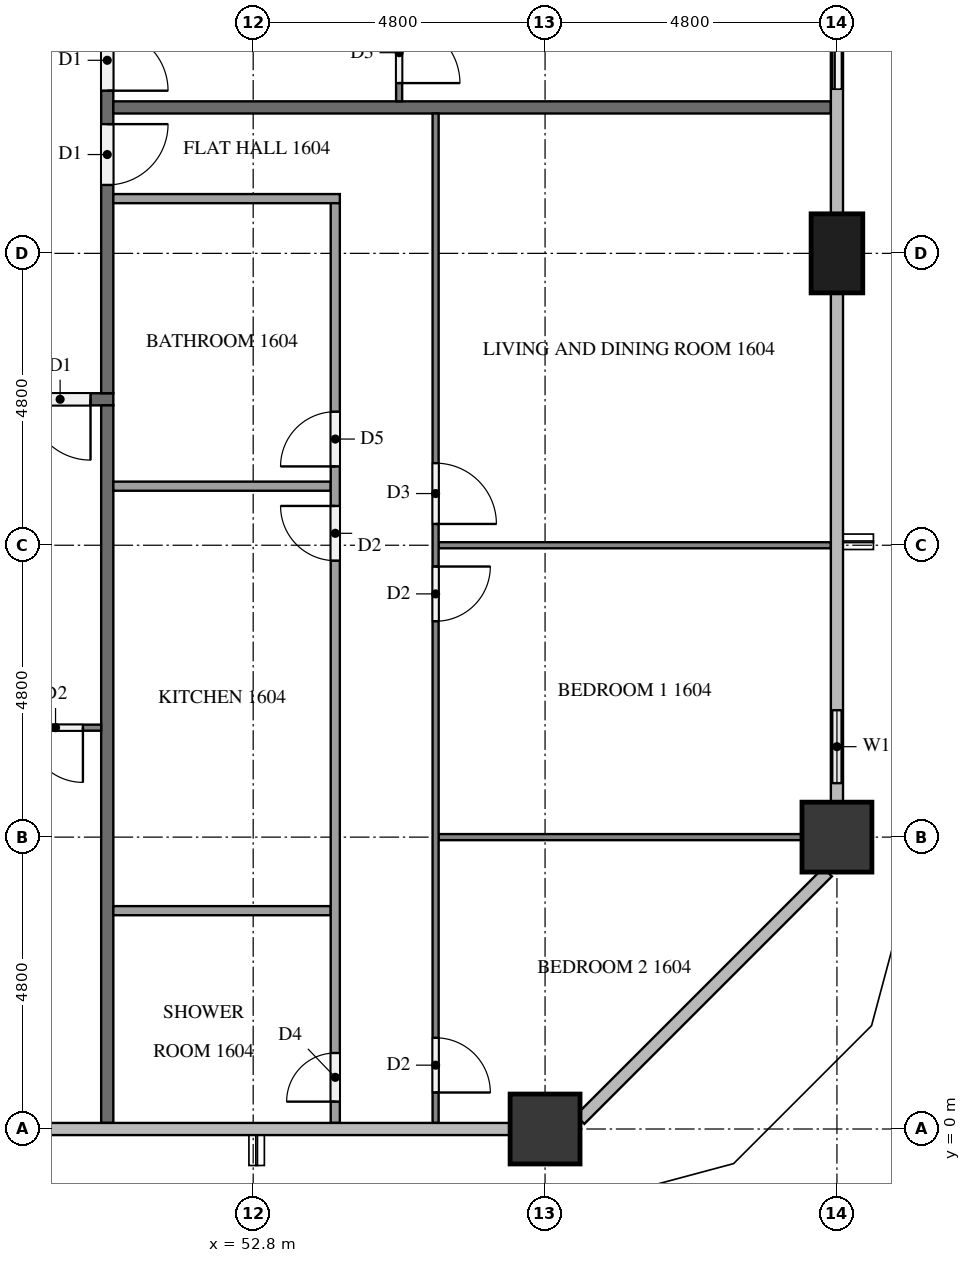
"""IFC4 building model, lengths in metres.
Left out: names, types, materials, properties, quantities, classifications, styles, units other than length and angle.
Written with IfcOpenShell. Run it as: python <this file> out.ifc"""

import sys

from ifc_helpers import new_model, si_unit, direction, frame, frame_2d, origin, origin_2d, place, context, subcontext, project, spatial, rectangle, extrude, element, fill, save


model = new_model("IFC4")
c1 = context("Model", 3, precision=1e-05, world=origin(), true_north=direction((0.0, 1.0)))
c2 = subcontext(c1, "Body", "Model", "MODEL_VIEW")
j1 = project(units=[si_unit("LENGTHUNIT", "METRE"), si_unit("PLANEANGLEUNIT", "RADIAN")], contexts=[c1])
p1 = place(None, origin())
s1 = spatial("IfcSite", under=j1, at=p1, CompositionType="ELEMENT")
p2 = place(p1, origin())
s2 = spatial("IfcBuilding", under=s1, at=p2, CompositionType="ELEMENT")
p3 = place(p2, frame((0.0, 0.0, 66.3)))
s3 = spatial("IfcBuildingStorey", under=s2, at=p3, CompositionType="ELEMENT", Elevation=66.3)
for number, where, z_axis, x_axis in (
    (1, (57.6, 0.0, 0.0), (0.0, 0.0, 1.0), (1.0, 0.0, 0.0)),
    (2, (62.4, 4.8, 0.0), (0.0, 0.0, 1.0), (1.0, 0.0, 0.0)),
):
    element("IfcColumn", number, at=place(p3, frame(where, z_axis=z_axis, x_axis=x_axis)), inside=s3, PredefinedType="COLUMN", context=c2, shape_type="SweptSolid", body=[
        extrude(rectangle(XDim=1.15, YDim=1.15, at=origin_2d()), origin(), (0.0, 0.0, 1.0), 3.2),
    ])
p4 = place(p3, frame((62.4, 14.4, 0.0), z_axis=(0.0, 0.0, 1.0), x_axis=(0.0, 1.0, 0.0)))
e3 = element("IfcColumn", 3, at=p4, inside=s3, PredefinedType="COLUMN", context=c2, shape_type="SweptSolid", body=[
    extrude(rectangle(XDim=1.3, YDim=0.85, at=origin_2d()), origin(), (0.0, 0.0, 1.0), 3.2),
])
p5 = place(p3, frame((62.4, 5.375, 0.0), z_axis=(0.0, 0.0, 1.0), x_axis=(0.0, 1.0, 0.0)))
e4 = element("IfcWall", 4, at=p5, inside=s3, PredefinedType="SOLIDWALL", context=c2, shape_type="SweptSolid", body=[
    extrude(rectangle(XDim=1.825, YDim=0.15, at=frame_2d((0.913, 0.0))), origin(), (0.0, 0.0, 1.0), 3.2),
])
p6 = place(p5, frame((0.312, 0.0, 0.9)))
e5 = element("IfcOpeningElement", 5, at=p6, cuts=e4, PredefinedType="OPENING", context=c2, shape_type="SweptSolid", body=[
    extrude(rectangle(XDim=1.2, YDim=1.4, at=frame_2d((0.6, 0.7))), frame((0.0, 0.085, 0.0), z_axis=(0.0, -1.0, 0.0), x_axis=(1.0, 0.0, 0.0)), (0.0, 0.0, 1.0), 0.17),
])
p7 = place(p3, frame((62.4, 16.8, 0.0), z_axis=(0.0, 0.0, 1.0), x_axis=(0.0, 1.0, 0.0)))
e6 = element("IfcWall", 6, at=p7, inside=s3, PredefinedType="SOLIDWALL", context=c2, shape_type="SweptSolid", body=[
    extrude(rectangle(XDim=2.4, YDim=0.15, at=frame_2d((1.2, 0.0))), origin(), (0.0, 0.0, 1.0), 3.2),
])
p8 = place(p7, frame((0.3, 0.0, 0.0)))
e7 = element("IfcOpeningElement", 7, at=p8, cuts=e6, PredefinedType="OPENING", context=c2, shape_type="SweptSolid", body=[
    extrude(rectangle(XDim=1.8, YDim=2.4, at=frame_2d((0.9, 1.2))), frame((0.0, 0.085, 0.0), z_axis=(0.0, -1.0, 0.0), x_axis=(1.0, 0.0, 0.0)), (0.0, 0.0, 1.0), 0.17),
])
p9 = place(p3, frame((50.5, 12.0, 0.0), z_axis=(0.0, 0.0, 1.0), x_axis=(-1.0, 0.0, 0.0)))
e8 = element("IfcWall", 8, at=p9, inside=s3, PredefinedType="PARTITIONING", context=c2, shape_type="SweptSolid", body=[
    extrude(rectangle(XDim=38.6, YDim=0.2, at=frame_2d((19.3, 0.0))), origin(), (0.0, 0.0, 1.0), 3.2),
])
p10 = place(p9, frame((37.225, 0.0, 0.0)))
e9 = element("IfcOpeningElement", 9, at=p10, cuts=e8, PredefinedType="OPENING", context=c2, shape_type="SweptSolid", body=[
    extrude(rectangle(XDim=1.0, YDim=2.1, at=frame_2d((0.5, 1.05))), frame((0.0, 0.11, 0.0), z_axis=(0.0, -1.0, 0.0), x_axis=(1.0, 0.0, 0.0)), (0.0, 0.0, 1.0), 0.22),
])
p11 = place(p9, frame((22.825, 0.0, 0.0)))
e10 = element("IfcOpeningElement", 10, at=p11, cuts=e8, PredefinedType="OPENING", context=c2, shape_type="SweptSolid", body=[
    extrude(rectangle(XDim=1.0, YDim=2.1, at=frame_2d((0.5, 1.05))), frame((0.0, 0.11, 0.0), z_axis=(0.0, -1.0, 0.0), x_axis=(1.0, 0.0, 0.0)), (0.0, 0.0, 1.0), 0.22),
])
p12 = place(p9, frame((0.375, 0.0, 0.0)))
e11 = element("IfcOpeningElement", 11, at=p12, cuts=e8, PredefinedType="OPENING", context=c2, shape_type="SweptSolid", body=[
    extrude(rectangle(XDim=1.0, YDim=2.1, at=frame_2d((0.5, 1.05))), frame((0.0, 0.11, 0.0), z_axis=(0.0, -1.0, 0.0), x_axis=(1.0, 0.0, 0.0)), (0.0, 0.0, 1.0), 0.22),
])
p13 = place(p3, frame((50.4, 40.7, 0.0), z_axis=(0.0, 0.0, 1.0), x_axis=(0.0, -1.0, 0.0)))
e12 = element("IfcWall", 12, at=p13, inside=s3, PredefinedType="PARTITIONING", context=c2, shape_type="SweptSolid", body=[
    extrude(rectangle(XDim=28.6, YDim=0.2, at=frame_2d((14.3, 0.0))), origin(), (0.0, 0.0, 1.0), 3.2),
])
p14 = place(p13, frame((24.175, 0.0, 0.0)))
e13 = element("IfcOpeningElement", 13, at=p14, cuts=e12, PredefinedType="OPENING", context=c2, shape_type="SweptSolid", body=[
    extrude(rectangle(XDim=1.0, YDim=2.1, at=frame_2d((0.5, 1.05))), frame((0.0, 0.11, 0.0), z_axis=(0.0, -1.0, 0.0), x_axis=(1.0, 0.0, 0.0)), (0.0, 0.0, 1.0), 0.22),
])
p15 = place(p13, frame((22.625, 0.0, 0.0)))
e14 = element("IfcOpeningElement", 14, at=p15, cuts=e12, PredefinedType="OPENING", context=c2, shape_type="SweptSolid", body=[
    extrude(rectangle(XDim=1.0, YDim=2.1, at=frame_2d((0.5, 1.05))), frame((0.0, 0.11, 0.0), z_axis=(0.0, -1.0, 0.0), x_axis=(1.0, 0.0, 0.0)), (0.0, 0.0, 1.0), 0.22),
])
p16 = place(p13, frame((10.625, 0.0, 0.0)))
e15 = element("IfcOpeningElement", 15, at=p16, cuts=e12, PredefinedType="OPENING", context=c2, shape_type="SweptSolid", body=[
    extrude(rectangle(XDim=1.0, YDim=2.1, at=frame_2d((0.5, 1.05))), frame((0.0, 0.11, 0.0), z_axis=(0.0, -1.0, 0.0), x_axis=(1.0, 0.0, 0.0)), (0.0, 0.0, 1.0), 0.22),
])
p17 = place(p3, frame((50.4, 11.9, 0.0), z_axis=(0.0, 0.0, 1.0), x_axis=(0.0, -1.0, 0.0)))
e16 = element("IfcWall", 16, at=p17, inside=s3, PredefinedType="PARTITIONING", context=c2, shape_type="SweptSolid", body=[
    extrude(rectangle(XDim=11.8, YDim=0.2, at=frame_2d((5.9, 0.0))), origin(), (0.0, 0.0, 1.0), 3.2),
])
p18 = place(p3, frame((50.5, 16.8, 0.0), z_axis=(0.0, 0.0, 1.0), x_axis=(1.0, 0.0, 0.0)))
e17 = element("IfcWall", 17, at=p18, inside=s3, PredefinedType="PARTITIONING", context=c2, shape_type="SweptSolid", body=[
    extrude(rectangle(XDim=11.8, YDim=0.2, at=frame_2d((5.9, 0.0))), origin(), (0.0, 0.0, 1.0), 3.2),
])
p19 = place(p3, frame((50.3, 6.6, 0.0), z_axis=(0.0, 0.0, 1.0), x_axis=(-1.0, 0.0, 0.0)))
e18 = element("IfcWall", 18, at=p19, inside=s3, PredefinedType="PARTITIONING", context=c2, shape_type="SweptSolid", body=[
    extrude(rectangle(XDim=9.4, YDim=0.1, at=frame_2d((4.7, 0.0))), origin(), (0.0, 0.0, 1.0), 3.2),
])
p20 = place(p19, frame((0.3, 0.0, 0.0)))
e19 = element("IfcOpeningElement", 19, at=p20, cuts=e18, PredefinedType="OPENING", context=c2, shape_type="SweptSolid", body=[
    extrude(rectangle(XDim=0.9, YDim=2.1, at=frame_2d((0.45, 1.05))), frame((0.0, 0.06, 0.0), z_axis=(0.0, -1.0, 0.0), x_axis=(1.0, 0.0, 0.0)), (0.0, 0.0, 1.0), 0.12),
])
p21 = place(p19, frame((8.1, 0.0, 0.0)))
e20 = element("IfcOpeningElement", 20, at=p21, cuts=e18, PredefinedType="OPENING", context=c2, shape_type="SweptSolid", body=[
    extrude(rectangle(XDim=1.0, YDim=2.1, at=frame_2d((0.5, 1.05))), frame((0.0, 0.06, 0.0), z_axis=(0.0, -1.0, 0.0), x_axis=(1.0, 0.0, 0.0)), (0.0, 0.0, 1.0), 0.12),
])
p22 = place(p3, frame((55.85, 9.6, 0.0), z_axis=(0.0, 0.0, 1.0), x_axis=(1.0, 0.0, 0.0)))
e21 = element("IfcWall", 21, at=p22, inside=s3, PredefinedType="PARTITIONING", context=c2, shape_type="SweptSolid", body=[
    extrude(rectangle(XDim=6.45, YDim=0.1, at=frame_2d((3.225, 0.0))), origin(), (0.0, 0.0, 1.0), 3.2),
])
p23 = place(p3, frame((55.85, 4.8, 0.0), z_axis=(0.0, 0.0, 1.0), x_axis=(1.0, 0.0, 0.0)))
e22 = element("IfcWall", 22, at=p23, inside=s3, PredefinedType="PARTITIONING", context=c2, shape_type="SweptSolid", body=[
    extrude(rectangle(XDim=5.975, YDim=0.1, at=frame_2d((2.987, 0.0))), origin(), (0.0, 0.0, 1.0), 3.2),
])
p24 = place(p3, frame((55.8, 16.7, 0.0), z_axis=(0.0, 0.0, 1.0), x_axis=(0.0, -1.0, 0.0)))
e23 = element("IfcWall", 23, at=p24, inside=s3, PredefinedType="PARTITIONING", context=c2, shape_type="SweptSolid", body=[
    extrude(rectangle(XDim=16.6, YDim=0.1, at=frame_2d((8.3, 0.0))), origin(), (0.0, 0.0, 1.0), 3.2),
])
p25 = place(p24, frame((5.75, 0.0, 0.0)))
e24 = element("IfcOpeningElement", 24, at=p25, cuts=e23, PredefinedType="OPENING", context=c2, shape_type="SweptSolid", body=[
    extrude(rectangle(XDim=1.0, YDim=2.1, at=frame_2d((0.5, 1.05))), frame((0.0, 0.06, 0.0), z_axis=(0.0, -1.0, 0.0), x_axis=(1.0, 0.0, 0.0)), (0.0, 0.0, 1.0), 0.12),
])
p26 = place(p24, frame((7.45, 0.0, 0.0)))
e25 = element("IfcOpeningElement", 25, at=p26, cuts=e23, PredefinedType="OPENING", context=c2, shape_type="SweptSolid", body=[
    extrude(rectangle(XDim=0.9, YDim=2.1, at=frame_2d((0.45, 1.05))), frame((0.0, 0.06, 0.0), z_axis=(0.0, -1.0, 0.0), x_axis=(1.0, 0.0, 0.0)), (0.0, 0.0, 1.0), 0.12),
])
p27 = place(p24, frame((15.2, 0.0, 0.0)))
e26 = element("IfcOpeningElement", 26, at=p27, cuts=e23, PredefinedType="OPENING", context=c2, shape_type="SweptSolid", body=[
    extrude(rectangle(XDim=0.9, YDim=2.1, at=frame_2d((0.45, 1.05))), frame((0.0, 0.06, 0.0), z_axis=(0.0, -1.0, 0.0), x_axis=(1.0, 0.0, 0.0)), (0.0, 0.0, 1.0), 0.12),
])
for number, where, z_axis, x_axis in (
    (27, (50.5, 10.571, 0.0), (0.0, 0.0, 1.0), (1.0, 0.0, 0.0)),
    (28, (50.5, 3.59, 0.0), (0.0, 0.0, 1.0), (1.0, 0.0, 0.0)),
):
    element("IfcWall", number, at=place(p3, frame(where, z_axis=z_axis, x_axis=x_axis)), inside=s3, PredefinedType="PARTITIONING", context=c2, shape_type="SweptSolid", body=[
        extrude(rectangle(XDim=3.575, YDim=0.15, at=frame_2d((1.788, 0.0))), origin(), (0.0, 0.0, 1.0), 3.2),
    ])
p28 = place(p3, frame((50.5, 15.3, 0.0), z_axis=(0.0, 0.0, 1.0), x_axis=(1.0, 0.0, 0.0)))
e29 = element("IfcWall", 29, at=p28, inside=s3, PredefinedType="PARTITIONING", context=c2, shape_type="SweptSolid", body=[
    extrude(rectangle(XDim=3.725, YDim=0.15, at=frame_2d((1.863, 0.0))), origin(), (0.0, 0.0, 1.0), 3.2),
])
p29 = place(p3, frame((54.15, 0.1, 0.0), z_axis=(0.0, 0.0, 1.0), x_axis=(0.0, 1.0, 0.0)))
e30 = element("IfcWall", 30, at=p29, inside=s3, PredefinedType="PARTITIONING", context=c2, shape_type="SweptSolid", body=[
    extrude(rectangle(XDim=15.125, YDim=0.15, at=frame_2d((7.562, 0.0))), origin(), (0.0, 0.0, 1.0), 3.2),
])
p30 = place(p29, frame((10.796, 0.0, 0.0)))
e31 = element("IfcOpeningElement", 31, at=p30, cuts=e30, PredefinedType="OPENING", context=c2, shape_type="SweptSolid", body=[
    extrude(rectangle(XDim=0.9, YDim=2.1, at=frame_2d((0.45, 1.05))), frame((0.0, 0.085, 0.0), z_axis=(0.0, -1.0, 0.0), x_axis=(1.0, 0.0, 0.0)), (0.0, 0.0, 1.0), 0.17),
])
p31 = place(p29, frame((9.246, 0.0, 0.0)))
e32 = element("IfcOpeningElement", 32, at=p31, cuts=e30, PredefinedType="OPENING", context=c2, shape_type="SweptSolid", body=[
    extrude(rectangle(XDim=0.9, YDim=2.1, at=frame_2d((0.45, 1.05))), frame((0.0, 0.085, 0.0), z_axis=(0.0, -1.0, 0.0), x_axis=(1.0, 0.0, 0.0)), (0.0, 0.0, 1.0), 0.17),
])
p32 = place(p29, frame((0.35, 0.0, 0.0)))
e33 = element("IfcOpeningElement", 33, at=p32, cuts=e30, PredefinedType="OPENING", context=c2, shape_type="SweptSolid", body=[
    extrude(rectangle(XDim=0.8, YDim=2.1, at=frame_2d((0.4, 1.05))), frame((0.0, 0.085, 0.0), z_axis=(0.0, -1.0, 0.0), x_axis=(1.0, 0.0, 0.0)), (0.0, 0.0, 1.0), 0.17),
])
p33 = place(p3, frame((55.2, 28.7, 0.0), z_axis=(0.0, 0.0, 1.0), x_axis=(0.0, -1.0, 0.0)))
e34 = element("IfcWall", 34, at=p33, inside=s3, PredefinedType="PARTITIONING", context=c2, shape_type="SweptSolid", body=[
    extrude(rectangle(XDim=11.8, YDim=0.1, at=frame_2d((5.9, 0.0))), origin(), (0.0, 0.0, 1.0), 3.2),
])
p34 = place(p33, frame((10.5, 0.0, 0.0)))
e35 = element("IfcOpeningElement", 35, at=p34, cuts=e34, PredefinedType="OPENING", context=c2, shape_type="SweptSolid", body=[
    extrude(rectangle(XDim=1.0, YDim=2.1, at=frame_2d((0.5, 1.05))), frame((0.0, 0.06, 0.0), z_axis=(0.0, -1.0, 0.0), x_axis=(1.0, 0.0, 0.0)), (0.0, 0.0, 1.0), 0.12),
])
p35 = place(p33, frame((0.3, 0.0, 0.0)))
e36 = element("IfcOpeningElement", 36, at=p35, cuts=e34, PredefinedType="OPENING", context=c2, shape_type="SweptSolid", body=[
    extrude(rectangle(XDim=0.9, YDim=2.1, at=frame_2d((0.45, 1.05))), frame((0.0, 0.06, 0.0), z_axis=(0.0, -1.0, 0.0), x_axis=(1.0, 0.0, 0.0)), (0.0, 0.0, 1.0), 0.12),
])
p36 = place(p6, origin())
e37 = element("IfcWindow", 37, at=p36, inside=s3, PartitioningType="SINGLE_PANEL", PredefinedType="WINDOW", context=c2, shape_type="SweptSolid", body=[
    extrude(rectangle(XDim=1.2, YDim=1.4, at=frame_2d((0.6, 0.7))), frame((0.0, 0.03, 0.0), z_axis=(0.0, -1.0, 0.0), x_axis=(1.0, 0.0, 0.0)), (0.0, 0.0, 1.0), 0.06),
])
fill(e5, e37)
p37 = place(p8, origin())
e38 = element("IfcDoor", 38, at=p37, inside=s3, OperationType="SLIDING_TO_LEFT", PredefinedType="DOOR", context=c2, shape_type="SweptSolid", body=[
    extrude(rectangle(XDim=1.8, YDim=2.4, at=frame_2d((0.9, 1.2))), frame((0.0, 0.025, 0.0), z_axis=(0.0, -1.0, 0.0), x_axis=(1.0, 0.0, 0.0)), (0.0, 0.0, 1.0), 0.05),
])
fill(e7, e38)
p38 = place(p12, origin())
e39 = element("IfcDoor", 39, at=p38, inside=s3, OperationType="SINGLE_SWING_LEFT", PredefinedType="DOOR", context=c2, shape_type="SweptSolid", body=[
    extrude(rectangle(XDim=1.0, YDim=2.1, at=frame_2d((0.5, 1.05))), frame((0.0, 0.025, 0.0), z_axis=(0.0, -1.0, 0.0), x_axis=(1.0, 0.0, 0.0)), (0.0, 0.0, 1.0), 0.05),
])
fill(e11, e39)
p39 = place(p14, origin())
e40 = element("IfcDoor", 40, at=p39, inside=s3, OperationType="SINGLE_SWING_LEFT", PredefinedType="DOOR", context=c2, shape_type="SweptSolid", body=[
    extrude(rectangle(XDim=1.0, YDim=2.1, at=frame_2d((0.5, 1.05))), frame((0.0, 0.025, 0.0), z_axis=(0.0, -1.0, 0.0), x_axis=(1.0, 0.0, 0.0)), (0.0, 0.0, 1.0), 0.05),
])
fill(e13, e40)
p40 = place(p15, origin())
e41 = element("IfcDoor", 41, at=p40, inside=s3, OperationType="SINGLE_SWING_RIGHT", PredefinedType="DOOR", context=c2, shape_type="SweptSolid", body=[
    extrude(rectangle(XDim=1.0, YDim=2.1, at=frame_2d((0.5, 1.05))), frame((0.0, 0.025, 0.0), z_axis=(0.0, -1.0, 0.0), x_axis=(1.0, 0.0, 0.0)), (0.0, 0.0, 1.0), 0.05),
])
fill(e14, e41)
p41 = place(p20, origin())
e42 = element("IfcDoor", 42, at=p41, inside=s3, OperationType="SINGLE_SWING_LEFT", PredefinedType="DOOR", context=c2, shape_type="SweptSolid", body=[
    extrude(rectangle(XDim=0.9, YDim=2.1, at=frame_2d((0.45, 1.05))), frame((0.0, 0.025, 0.0), z_axis=(0.0, -1.0, 0.0), x_axis=(1.0, 0.0, 0.0)), (0.0, 0.0, 1.0), 0.05),
])
fill(e19, e42)
p42 = place(p25, origin())
e43 = element("IfcDoor", 43, at=p42, inside=s3, OperationType="SINGLE_SWING_RIGHT", PredefinedType="DOOR", context=c2, shape_type="SweptSolid", body=[
    extrude(rectangle(XDim=1.0, YDim=2.1, at=frame_2d((0.5, 1.05))), frame((0.0, 0.025, 0.0), z_axis=(0.0, -1.0, 0.0), x_axis=(1.0, 0.0, 0.0)), (0.0, 0.0, 1.0), 0.05),
])
fill(e24, e43)
p43 = place(p26, origin())
e44 = element("IfcDoor", 44, at=p43, inside=s3, OperationType="SINGLE_SWING_LEFT", PredefinedType="DOOR", context=c2, shape_type="SweptSolid", body=[
    extrude(rectangle(XDim=0.9, YDim=2.1, at=frame_2d((0.45, 1.05))), frame((0.0, 0.025, 0.0), z_axis=(0.0, -1.0, 0.0), x_axis=(1.0, 0.0, 0.0)), (0.0, 0.0, 1.0), 0.05),
])
fill(e25, e44)
p44 = place(p27, origin())
e45 = element("IfcDoor", 45, at=p44, inside=s3, OperationType="SINGLE_SWING_RIGHT", PredefinedType="DOOR", context=c2, shape_type="SweptSolid", body=[
    extrude(rectangle(XDim=0.9, YDim=2.1, at=frame_2d((0.45, 1.05))), frame((0.0, 0.025, 0.0), z_axis=(0.0, -1.0, 0.0), x_axis=(1.0, 0.0, 0.0)), (0.0, 0.0, 1.0), 0.05),
])
fill(e26, e45)
p45 = place(p30, origin())
e46 = element("IfcDoor", 46, at=p45, inside=s3, OperationType="SINGLE_SWING_LEFT", PredefinedType="DOOR", context=c2, shape_type="SweptSolid", body=[
    extrude(rectangle(XDim=0.9, YDim=2.1, at=frame_2d((0.45, 1.05))), frame((0.0, 0.025, 0.0), z_axis=(0.0, -1.0, 0.0), x_axis=(1.0, 0.0, 0.0)), (0.0, 0.0, 1.0), 0.05),
])
fill(e31, e46)
p46 = place(p31, origin())
e47 = element("IfcDoor", 47, at=p46, inside=s3, OperationType="SINGLE_SWING_RIGHT", PredefinedType="DOOR", context=c2, shape_type="SweptSolid", body=[
    extrude(rectangle(XDim=0.9, YDim=2.1, at=frame_2d((0.45, 1.05))), frame((0.0, 0.025, 0.0), z_axis=(0.0, -1.0, 0.0), x_axis=(1.0, 0.0, 0.0)), (0.0, 0.0, 1.0), 0.05),
])
fill(e32, e47)
p47 = place(p32, origin())
e48 = element("IfcDoor", 48, at=p47, inside=s3, OperationType="SINGLE_SWING_LEFT", PredefinedType="DOOR", context=c2, shape_type="SweptSolid", body=[
    extrude(rectangle(XDim=0.8, YDim=2.1, at=frame_2d((0.4, 1.05))), frame((0.0, 0.025, 0.0), z_axis=(0.0, -1.0, 0.0), x_axis=(1.0, 0.0, 0.0)), (0.0, 0.0, 1.0), 0.05),
])
fill(e33, e48)
p48 = place(p34, origin())
e49 = element("IfcDoor", 49, at=p48, inside=s3, OperationType="SINGLE_SWING_RIGHT", PredefinedType="DOOR", context=c2, shape_type="SweptSolid", body=[
    extrude(rectangle(XDim=1.0, YDim=2.1, at=frame_2d((0.5, 1.05))), frame((0.0, 0.025, 0.0), z_axis=(0.0, -1.0, 0.0), x_axis=(1.0, 0.0, 0.0)), (0.0, 0.0, 1.0), 0.05),
])
fill(e35, e49)
save(model, sys.argv[1])
